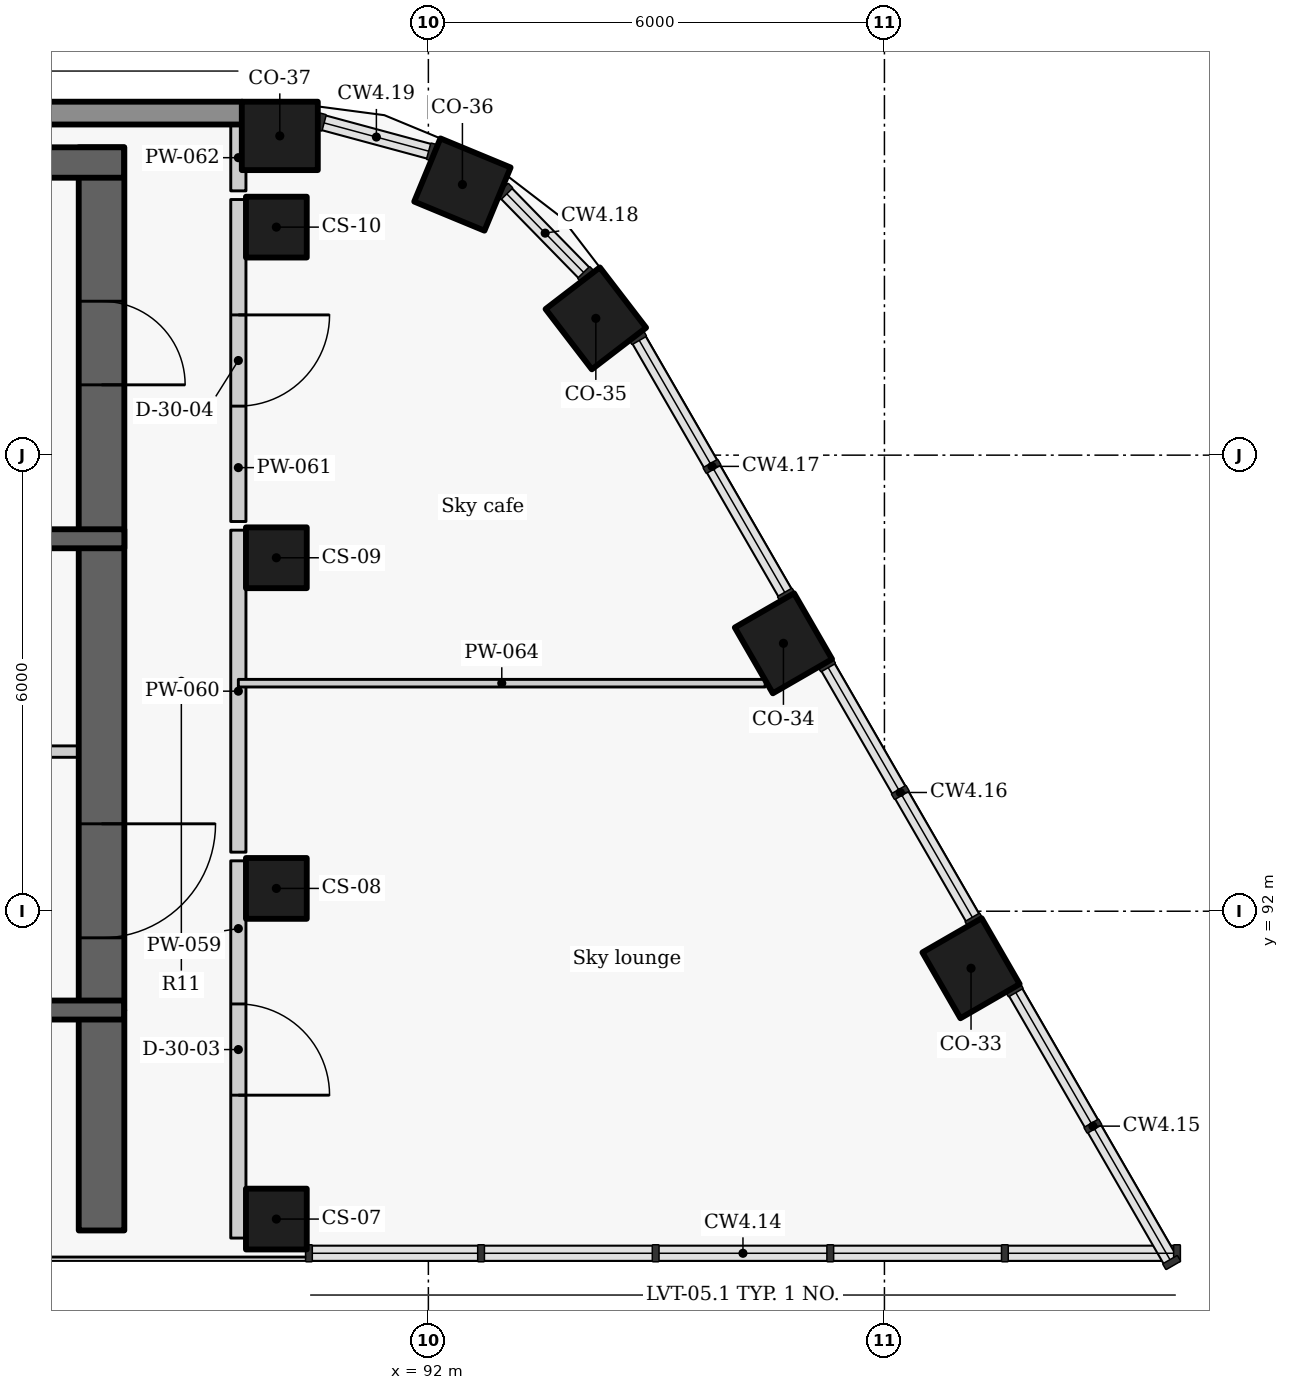
"""IFC4 building model, lengths in metres.
Left out: names, types, materials, properties, quantities, classifications, styles, units other than length and angle.
Written with IfcOpenShell. Run it as: python <this file> out.ifc"""

import sys

from ifc_helpers import new_model, si_unit, direction, frame, frame_2d, origin, origin_2d, place, context, subcontext, project, spatial, rectangle, extrude, element, fill, save


model = new_model("IFC4")
c1 = context("Model", 3, precision=1e-05, world=origin(), true_north=direction((0.0, 1.0)))
c2 = subcontext(c1, "Body", "Model", "MODEL_VIEW")
j1 = project(units=[si_unit("LENGTHUNIT", "METRE"), si_unit("PLANEANGLEUNIT", "RADIAN")], contexts=[c1])
p1 = place(None, origin())
s1 = spatial("IfcSite", under=j1, at=p1, CompositionType="ELEMENT")
p2 = place(p1, origin())
s2 = spatial("IfcBuilding", under=s1, at=p2, CompositionType="ELEMENT")
p3 = place(p2, frame((0.0, 0.0, 279.6)))
s3 = spatial("IfcBuildingStorey", under=s2, at=p3, CompositionType="ELEMENT", Elevation=279.6)
for number, where, z_axis, x_axis in (
    (1, (99.139, 91.25, 0.0), (0.0, 0.0, 1.0), (-0.5, 0.866, 0.0)),
    (2, (96.671, 95.525, 0.0), (0.0, 0.0, 1.0), (-0.5, 0.866, 0.0)),
    (3, (94.203, 99.8, 0.0), (0.0, 0.0, 1.0), (-0.609, 0.793, 0.0)),
    (4, (92.448, 101.56, 0.0), (0.0, 0.0, 1.0), (-0.924, 0.383, 0.0)),
    (5, (90.045, 102.2, 0.0), (0.0, 0.0, 1.0), (-1.0, 0.0, 0.0)),
):
    element("IfcColumn", number, at=place(p3, frame(where, z_axis=z_axis, x_axis=x_axis)), inside=s3, PredefinedType="COLUMN", context=c2, shape_type="SweptSolid", body=[
        extrude(rectangle(XDim=1.0, YDim=0.9, at=origin_2d()), origin(), (0.0, 0.0, 1.0), 3.6),
    ])
for number, where, z_axis, x_axis in (
    (6, (90.0, 87.95, 0.0), (0.0, 0.0, 1.0), (0.0, 1.0, 0.0)),
    (7, (90.0, 92.3, 0.0), (0.0, 0.0, 1.0), (0.0, 1.0, 0.0)),
    (8, (90.0, 96.65, 0.0), (0.0, 0.0, 1.0), (0.0, 1.0, 0.0)),
    (9, (90.0, 101.0, 0.0), (0.0, 0.0, 1.0), (0.0, 1.0, 0.0)),
):
    element("IfcColumn", number, at=place(p3, frame(where, z_axis=z_axis, x_axis=x_axis)), inside=s3, PredefinedType="COLUMN", context=c2, shape_type="SweptSolid", body=[
        extrude(rectangle(XDim=0.8, YDim=0.8, at=origin_2d()), origin(), (0.0, 0.0, 1.0), 3.6),
    ])
p4 = place(p3, frame((89.549, 102.5, 0.0), z_axis=(0.0, 0.0, 1.0), x_axis=(-1.0, 0.0, 0.0)))
e10 = element("IfcWall", 10, at=p4, inside=s3, PredefinedType="SOLIDWALL", context=c2, shape_type="SweptSolid", body=[
    extrude(rectangle(XDim=19.134, YDim=0.3, at=frame_2d((9.567, 0.0))), origin(), (0.0, 0.0, 1.0), 2.725),
])
p5 = place(p3, frame((85.397, 94.1, 0.0), z_axis=(0.0, 0.0, 1.0), x_axis=(1.0, 0.0, 0.0)))
e11 = element("IfcWall", 11, at=p5, inside=s3, PredefinedType="PARTITIONING", context=c2, shape_type="SweptSolid", body=[
    extrude(rectangle(XDim=2.603, YDim=0.15, at=frame_2d((1.302, 0.0))), origin(), (0.0, 0.0, 1.0), 3.325),
])
p6 = place(p5, frame((0.528, 0.0, 0.0)))
e12 = element("IfcOpeningElement", 12, at=p6, cuts=e11, PredefinedType="OPENING", context=c2, shape_type="SweptSolid", body=[
    extrude(rectangle(XDim=0.9, YDim=2.1, at=frame_2d((0.45, 1.05))), frame((0.0, 0.085, 0.0), z_axis=(0.0, -1.0, 0.0), x_axis=(1.0, 0.0, 0.0)), (0.0, 0.0, 1.0), 0.17),
])
p7 = place(p3, frame((87.7, 102.05, -0.275), z_axis=(0.0, 0.0, 1.0), x_axis=(0.0, -1.0, 0.0)))
e13 = element("IfcWall", 13, at=p7, inside=s3, PredefinedType="SHEAR", context=c2, shape_type="SweptSolid", body=[
    extrude(rectangle(XDim=11.35, YDim=0.6, at=frame_2d((5.675, 0.0))), origin(), (0.0, 0.0, 1.0), 3.6),
])
p8 = place(p7, frame((8.9, 0.0, 0.275)))
e14 = element("IfcOpeningElement", 14, at=p8, cuts=e13, PredefinedType="OPENING", context=c2, shape_type="SweptSolid", body=[
    extrude(rectangle(XDim=1.5, YDim=2.1, at=frame_2d((0.75, 1.05))), frame((0.0, 0.31, 0.0), z_axis=(0.0, -1.0, 0.0), x_axis=(1.0, 0.0, 0.0)), (0.0, 0.0, 1.0), 0.62),
])
p9 = place(p7, frame((2.025, 0.0, 0.275)))
e15 = element("IfcOpeningElement", 15, at=p9, cuts=e13, PredefinedType="OPENING", context=c2, shape_type="SweptSolid", body=[
    extrude(rectangle(XDim=1.1, YDim=2.1, at=frame_2d((0.55, 1.05))), frame((0.0, 0.31, 0.0), z_axis=(0.0, -1.0, 0.0), x_axis=(1.0, 0.0, 0.0)), (0.0, 0.0, 1.0), 0.62),
])
p10 = place(p3, frame((80.547, 96.9, -0.275), z_axis=(0.0, 0.0, 1.0), x_axis=(1.0, 0.0, 0.0)))
e16 = element("IfcWall", 16, at=p10, inside=s3, PredefinedType="SHEAR", context=c2, shape_type="SweptSolid", body=[
    extrude(rectangle(XDim=7.453, YDim=0.25, at=frame_2d((3.727, 0.0))), origin(), (0.0, 0.0, 1.0), 3.6),
])
p11 = place(p10, frame((3.302, 0.0, 0.275)))
e17 = element("IfcOpeningElement", 17, at=p11, cuts=e16, PredefinedType="OPENING", context=c2, shape_type="SweptSolid", body=[
    extrude(rectangle(XDim=1.1, YDim=2.1, at=frame_2d((0.55, 1.05))), frame((0.0, 0.135, 0.0), z_axis=(0.0, -1.0, 0.0), x_axis=(1.0, 0.0, 0.0)), (0.0, 0.0, 1.0), 0.27),
])
p12 = place(p3, frame((89.5, 92.663, 0.0), z_axis=(0.0, 0.0, 1.0), x_axis=(0.0, -1.0, 0.0)))
e18 = element("IfcWall", 18, at=p12, inside=s3, PredefinedType="PARTITIONING", context=c2, shape_type="SweptSolid", body=[
    extrude(rectangle(XDim=4.963, YDim=0.2, at=frame_2d((2.481, 0.0))), origin(), (0.0, 0.0, 1.0), 3.325),
])
p13 = place(p12, frame((1.883, 0.0, 0.0)))
e19 = element("IfcOpeningElement", 19, at=p13, cuts=e18, PredefinedType="OPENING", context=c2, shape_type="SweptSolid", body=[
    extrude(rectangle(XDim=1.2, YDim=2.1, at=frame_2d((0.6, 1.05))), frame((0.0, 0.11, 0.0), z_axis=(0.0, -1.0, 0.0), x_axis=(1.0, 0.0, 0.0)), (0.0, 0.0, 1.0), 0.22),
])
p14 = place(p3, frame((89.5, 92.777, 0.0), z_axis=(0.0, 0.0, 1.0), x_axis=(0.0, 1.0, 0.0)))
e20 = element("IfcWall", 20, at=p14, inside=s3, PredefinedType="PARTITIONING", context=c2, shape_type="SweptSolid", body=[
    extrude(rectangle(XDim=4.236, YDim=0.2, at=frame_2d((2.118, 0.0))), origin(), (0.0, 0.0, 1.0), 3.325),
])
p15 = place(p3, frame((89.5, 101.363, 0.0), z_axis=(0.0, 0.0, 1.0), x_axis=(0.0, -1.0, 0.0)))
e21 = element("IfcWall", 21, at=p15, inside=s3, PredefinedType="PARTITIONING", context=c2, shape_type="SweptSolid", body=[
    extrude(rectangle(XDim=4.236, YDim=0.2, at=frame_2d((2.118, 0.0))), origin(), (0.0, 0.0, 1.0), 3.325),
])
p16 = place(p15, frame((1.518, 0.0, 0.0)))
e22 = element("IfcOpeningElement", 22, at=p16, cuts=e21, PredefinedType="OPENING", context=c2, shape_type="SweptSolid", body=[
    extrude(rectangle(XDim=1.2, YDim=2.1, at=frame_2d((0.6, 1.05))), frame((0.0, 0.11, 0.0), z_axis=(0.0, -1.0, 0.0), x_axis=(1.0, 0.0, 0.0)), (0.0, 0.0, 1.0), 0.22),
])
p17 = place(p3, frame((89.5, 101.477, 0.0), z_axis=(0.0, 0.0, 1.0), x_axis=(0.0, 1.0, 0.0)))
e23 = element("IfcWall", 23, at=p17, inside=s3, PredefinedType="PARTITIONING", context=c2, shape_type="SweptSolid", body=[
    extrude(rectangle(XDim=0.873, YDim=0.2, at=frame_2d((0.437, 0.0))), origin(), (0.0, 0.0, 1.0), 3.325),
])
p18 = place(p3, frame((89.5, 95.0, 0.0), z_axis=(0.0, 0.0, 1.0), x_axis=(1.0, 0.0, 0.0)))
e24 = element("IfcWall", 24, at=p18, inside=s3, PredefinedType="PARTITIONING", context=c2, shape_type="SweptSolid", body=[
    extrude(rectangle(XDim=6.931, YDim=0.1, at=frame_2d((3.466, 0.0))), origin(), (0.0, 0.0, 1.0), 2.805),
])
p19 = place(p3, frame((87.7, 87.8, -0.275), z_axis=(0.0, 0.0, 1.0), x_axis=(0.0, 1.0, 0.0)))
e25 = element("IfcWall", 25, at=p19, inside=s3, PredefinedType="SHEAR", context=c2, shape_type="SweptSolid", body=[
    extrude(rectangle(XDim=2.896, YDim=0.6, at=frame_2d((1.448, 0.0))), origin(), (0.0, 0.0, 1.0), 3.6),
])
p20 = place(p3, frame((85.404, 90.7, -0.275), z_axis=(0.0, 0.0, 1.0), x_axis=(1.0, 0.0, 0.0)))
e26 = element("IfcWall", 26, at=p20, inside=s3, PredefinedType="SHEAR", context=c2, shape_type="SweptSolid", body=[
    extrude(rectangle(XDim=2.592, YDim=0.25, at=frame_2d((1.296, 0.0))), origin(), (0.0, 0.0, 1.0), 3.6),
])
p21 = place(p3, frame((72.004, 101.85, -0.275), z_axis=(0.0, 0.0, 1.0), x_axis=(1.0, 0.0, 0.0)))
e27 = element("IfcWall", 27, at=p21, inside=s3, PredefinedType="SHEAR", context=c2, shape_type="SweptSolid", body=[
    extrude(rectangle(XDim=15.992, YDim=0.4, at=frame_2d((7.996, 0.0))), origin(), (0.0, 0.0, 1.0), 3.6),
])
p22 = place(p13, origin())
e28 = element("IfcDoor", 28, at=p22, inside=s3, OperationType="SINGLE_SWING_RIGHT", PredefinedType="DOOR", context=c2, shape_type="SweptSolid", body=[
    extrude(rectangle(XDim=1.2, YDim=2.1, at=frame_2d((0.6, 1.05))), frame((0.0, 0.025, 0.0), z_axis=(0.0, -1.0, 0.0), x_axis=(1.0, 0.0, 0.0)), (0.0, 0.0, 1.0), 0.05),
])
fill(e19, e28)
p23 = place(p16, origin())
e29 = element("IfcDoor", 29, at=p23, inside=s3, OperationType="SINGLE_SWING_LEFT", PredefinedType="DOOR", context=c2, shape_type="SweptSolid", body=[
    extrude(rectangle(XDim=1.2, YDim=2.1, at=frame_2d((0.6, 1.05))), frame((0.0, 0.025, 0.0), z_axis=(0.0, -1.0, 0.0), x_axis=(1.0, 0.0, 0.0)), (0.0, 0.0, 1.0), 0.05),
])
fill(e22, e29)
p24 = place(p8, origin())
e30 = element("IfcDoor", 30, at=p24, inside=s3, OperationType="DOUBLE_DOOR_SINGLE_SWING", PredefinedType="DOOR", context=c2, shape_type="SweptSolid", body=[
    extrude(rectangle(XDim=1.5, YDim=2.1, at=frame_2d((0.75, 1.05))), frame((0.0, 0.025, 0.0), z_axis=(0.0, -1.0, 0.0), x_axis=(1.0, 0.0, 0.0)), (0.0, 0.0, 1.0), 0.05),
])
fill(e14, e30)
p25 = place(p9, origin())
e31 = element("IfcDoor", 31, at=p25, inside=s3, OperationType="SINGLE_SWING_RIGHT", PredefinedType="DOOR", context=c2, shape_type="SweptSolid", body=[
    extrude(rectangle(XDim=1.1, YDim=2.1, at=frame_2d((0.55, 1.05))), frame((0.0, 0.025, 0.0), z_axis=(0.0, -1.0, 0.0), x_axis=(1.0, 0.0, 0.0)), (0.0, 0.0, 1.0), 0.05),
])
fill(e15, e31)
save(model, sys.argv[1])
